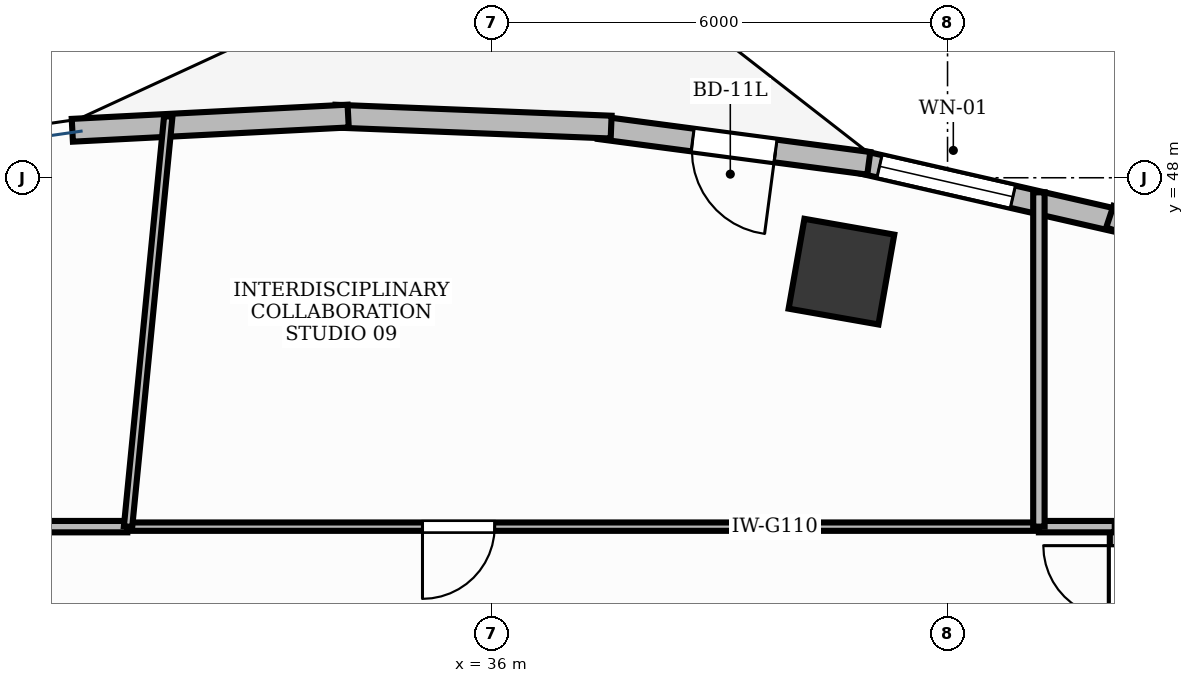
"""IFC4 building model, lengths in metres.
Left out: names, types, materials, properties, quantities, classifications, styles, units other than length and angle.
Written with IfcOpenShell. Run it as: python <this file> out.ifc"""

import sys

from ifc_helpers import new_model, si_unit, direction, frame, frame_2d, origin, origin_2d, place, context, subcontext, project, spatial, rectangle, extrude, element, fill, save


model = new_model("IFC4")
c1 = context("Model", 3, precision=1e-05, world=origin(), true_north=direction((0.0, 1.0)))
c2 = subcontext(c1, "Body", "Model", "MODEL_VIEW")
j1 = project(units=[si_unit("LENGTHUNIT", "METRE"), si_unit("PLANEANGLEUNIT", "RADIAN")], contexts=[c1])
p1 = place(None, origin())
s1 = spatial("IfcSite", under=j1, at=p1, CompositionType="ELEMENT")
p2 = place(p1, origin())
s2 = spatial("IfcBuilding", under=s1, at=p2, CompositionType="ELEMENT")
p3 = place(p2, frame((0.0, 0.0, 144.6)))
s3 = spatial("IfcBuildingStorey", under=s2, at=p3, CompositionType="ELEMENT", Elevation=144.6)
p4 = place(p3, frame((40.604, 46.765, -0.0), z_axis=(0.0, 0.0, 1.0), x_axis=(-0.984868307662, 0.173304404339, 0.0)))
e1 = element("IfcColumn", 1, at=p4, inside=s3, PredefinedType="COLUMN", context=c2, shape_type="SweptSolid", body=[
    extrude(rectangle(XDim=1.2, YDim=1.2, at=origin_2d()), origin(), (0.0, 0.0, 1.0), 3.881),
])
p5 = place(p3, frame((44.278, 47.426, 0.0), z_axis=(0.0, 0.0, 1.0), x_axis=(-0.974836214244, 0.222922307989, 0.0)))
e2 = element("IfcWall", 2, at=p5, inside=s3, PredefinedType="STANDARD", context=c2, shape_type="SweptSolid", body=[
    extrude(rectangle(XDim=3.535, YDim=0.3, at=frame_2d((1.768, 0.0))), origin(), (0.0, 0.0, 1.0), 3.88),
])
p6 = place(p5, frame((1.454, 0.0, 0.9)))
e3 = element("IfcOpeningElement", 3, at=p6, cuts=e2, PredefinedType="OPENING", context=c2, shape_type="SweptSolid", body=[
    extrude(rectangle(XDim=1.8, YDim=2.1, at=frame_2d((0.9, 1.05))), frame((0.0, 0.165, 0.0), z_axis=(0.0, -1.0, 0.0), x_axis=(1.0, 0.0, 0.0)), (0.0, 0.0, 1.0), 0.33),
])
p7 = place(p3, frame((40.964, 48.19, 0.0), z_axis=(0.0, 0.0, 1.0), x_axis=(-0.991369257822, 0.131099178664, 0.0)))
e4 = element("IfcWall", 4, at=p7, inside=s3, PredefinedType="STANDARD", context=c2, shape_type="SweptSolid", body=[
    extrude(rectangle(XDim=3.575, YDim=0.3, at=frame_2d((1.788, 0.0))), origin(), (0.0, 0.0, 1.0), 3.88),
])
p8 = place(p7, frame((1.238, 0.0, 0.0)))
e5 = element("IfcOpeningElement", 5, at=p8, cuts=e4, PredefinedType="OPENING", context=c2, shape_type="SweptSolid", body=[
    extrude(rectangle(XDim=1.1, YDim=2.15, at=frame_2d((0.55, 1.075))), frame((0.0, 0.165, 0.0), z_axis=(0.0, -1.0, 0.0), x_axis=(1.0, 0.0, 0.0)), (0.0, 0.0, 1.0), 0.33),
])
p9 = place(p3, frame((47.471, 46.378, 0.0), z_axis=(0.0, 0.0, 1.0), x_axis=(-0.948946814906, 0.315436114737, 0.0)))
e6 = element("IfcWall", 6, at=p9, inside=s3, PredefinedType="STANDARD", context=c2, shape_type="SweptSolid", body=[
    extrude(rectangle(XDim=3.516, YDim=0.3, at=frame_2d((1.758, 0.0))), origin(), (0.0, 0.0, 1.0), 3.88),
])
p10 = place(p3, frame((37.574, 48.666, 0.0), z_axis=(0.0, 0.0, 1.0), x_axis=(-0.999212076676, 0.039689114679, 0.0)))
e7 = element("IfcWall", 7, at=p10, inside=s3, PredefinedType="STANDARD", context=c2, shape_type="SweptSolid", body=[
    extrude(rectangle(XDim=3.635, YDim=0.3, at=frame_2d((1.818, 0.0))), origin(), (0.0, 0.0, 1.0), 3.88),
])
p11 = place(p3, frame((34.115, 48.812, 0.0), z_axis=(0.0, 0.0, 1.0), x_axis=(-0.998674767218, -0.051465613004, 0.0)))
e8 = element("IfcWall", 8, at=p11, inside=s3, PredefinedType="STANDARD", context=c2, shape_type="SweptSolid", body=[
    extrude(rectangle(XDim=3.634, YDim=0.3, at=frame_2d((1.817, 0.0))), origin(), (0.0, 0.0, 1.0), 3.88),
])
p12 = place(p3, frame((44.21, 33.175, 0.0), z_axis=(0.0, 0.0, 1.0), x_axis=(0.0, 1.0, 0.0)))
e9 = element("IfcWall", 9, at=p12, inside=s3, PredefinedType="PARTITIONING", context=c2, shape_type="SweptSolid", body=[
    extrude(rectangle(XDim=10.225, YDim=0.15, at=frame_2d((5.112, 0.0))), origin(), (0.0, 0.0, 1.0), 2.22),
])
p13 = place(p12, frame((9.035, 0.0, 0.0)))
e10 = element("IfcOpeningElement", 10, at=p13, cuts=e9, PredefinedType="OPENING", context=c2, shape_type="SweptSolid", body=[
    extrude(rectangle(XDim=0.95, YDim=2.15, at=frame_2d((0.475, 1.075))), frame((0.0, 0.09, 0.0), z_axis=(0.0, -1.0, 0.0), x_axis=(1.0, 0.0, 0.0)), (0.0, 0.0, 1.0), 0.18),
])
p14 = place(p3, frame((43.192, 43.41, 0.0), z_axis=(0.0, 0.0, 1.0), x_axis=(-1.0, 0.0, 0.0)))
e11 = element("IfcWall", 11, at=p14, inside=s3, PredefinedType="MOVABLE", context=c2, shape_type="SweptSolid", body=[
    extrude(rectangle(XDim=11.973, YDim=0.11, at=frame_2d((5.987, 0.0))), origin(), (0.0, 0.0, 1.0), 2.22),
])
p15 = place(p14, frame((7.15, 0.0, 0.0)))
e12 = element("IfcOpeningElement", 12, at=p15, cuts=e11, PredefinedType="OPENING", context=c2, shape_type="SweptSolid", body=[
    extrude(rectangle(XDim=0.95, YDim=2.15, at=frame_2d((0.475, 1.075))), frame((0.0, 0.07, 0.0), z_axis=(0.0, -1.0, 0.0), x_axis=(1.0, 0.0, 0.0)), (0.0, 0.0, 1.0), 0.14),
])
p16 = place(p3, frame((31.209, 43.41, 0.0), z_axis=(0.0, 0.0, 1.0), x_axis=(-1.0, 0.0, 0.0)))
e13 = element("IfcWall", 13, at=p16, inside=s3, PredefinedType="PARTITIONING", context=c2, shape_type="SweptSolid", body=[
    extrude(rectangle(XDim=11.166, YDim=0.15, at=frame_2d((5.583, 0.0))), origin(), (0.0, 0.0, 1.0), 2.22),
])
p17 = place(p16, frame((3.494, 0.0, 0.0)))
e14 = element("IfcOpeningElement", 14, at=p17, cuts=e13, PredefinedType="OPENING", context=c2, shape_type="SweptSolid", body=[
    extrude(rectangle(XDim=0.95, YDim=2.15, at=frame_2d((0.475, 1.075))), frame((0.0, 0.09, 0.0), z_axis=(0.0, -1.0, 0.0), x_axis=(1.0, 0.0, 0.0)), (0.0, 0.0, 1.0), 0.18),
])
p18 = place(p3, frame((44.2, 43.41, 0.0), z_axis=(0.0, 0.0, 1.0), x_axis=(-1.0, 0.0, 0.0)))
e15 = element("IfcWall", 15, at=p18, inside=s3, PredefinedType="PARTITIONING", context=c2, shape_type="SweptSolid", body=[
    extrude(rectangle(XDim=0.998, YDim=0.15, at=frame_2d((0.499, 0.0))), origin(), (0.0, 0.0, 1.0), 2.22),
])
p19 = place(p3, frame((43.202, 43.41, 0.0), z_axis=(0.0, 0.0, 1.0), x_axis=(0.0, 1.0, 0.0)))
e16 = element("IfcWall", 16, at=p19, inside=s3, PredefinedType="PARTITIONING", context=c2, shape_type="SweptSolid", body=[
    extrude(rectangle(XDim=4.398, YDim=0.15, at=frame_2d((2.199, 0.0))), origin(), (0.0, 0.0, 1.0), 2.22),
])
p20 = place(p3, frame((31.219, 43.41, 0.0), z_axis=(0.0, 0.0, 1.0), x_axis=(0.097560057389, 0.995229639431, 0.0)))
e17 = element("IfcWall", 17, at=p20, inside=s3, PredefinedType="MOVABLE", context=c2, shape_type="SweptSolid", body=[
    extrude(rectangle(XDim=5.423, YDim=0.11, at=frame_2d((2.711, 0.0))), origin(), (0.0, 0.0, 1.0), 2.22),
])
p21 = place(p6, origin())
e18 = element("IfcWindow", 18, at=p21, inside=s3, PartitioningType="SINGLE_PANEL", PredefinedType="WINDOW", context=c2, shape_type="SweptSolid", body=[
    extrude(rectangle(XDim=1.8, YDim=2.1, at=frame_2d((0.9, 1.05))), frame((0.0, 0.03, 0.0), z_axis=(0.0, -1.0, 0.0), x_axis=(1.0, 0.0, 0.0)), (0.0, 0.0, 1.0), 0.06),
])
fill(e3, e18)
p22 = place(p8, origin())
e19 = element("IfcDoor", 19, at=p22, inside=s3, OperationType="SINGLE_SWING_LEFT", PredefinedType="DOOR", context=c2, shape_type="SweptSolid", body=[
    extrude(rectangle(XDim=1.1, YDim=2.15, at=frame_2d((0.55, 1.075))), frame((0.0, 0.025, 0.0), z_axis=(0.0, -1.0, 0.0), x_axis=(1.0, 0.0, 0.0)), (0.0, 0.0, 1.0), 0.05),
])
fill(e5, e19)
p23 = place(p13, origin())
e20 = element("IfcDoor", 20, at=p23, inside=s3, OperationType="SINGLE_SWING_RIGHT", PredefinedType="DOOR", context=c2, shape_type="SweptSolid", body=[
    extrude(rectangle(XDim=0.95, YDim=2.15, at=frame_2d((0.475, 1.075))), frame((0.0, 0.025, 0.0), z_axis=(0.0, -1.0, 0.0), x_axis=(1.0, 0.0, 0.0)), (0.0, 0.0, 1.0), 0.05),
])
fill(e10, e20)
p24 = place(p15, origin())
e21 = element("IfcDoor", 21, at=p24, inside=s3, OperationType="SINGLE_SWING_RIGHT", PredefinedType="DOOR", context=c2, shape_type="SweptSolid", body=[
    extrude(rectangle(XDim=0.95, YDim=2.15, at=frame_2d((0.475, 1.075))), frame((0.0, 0.025, 0.0), z_axis=(0.0, -1.0, 0.0), x_axis=(1.0, 0.0, 0.0)), (0.0, 0.0, 1.0), 0.05),
])
fill(e12, e21)
save(model, sys.argv[1])
